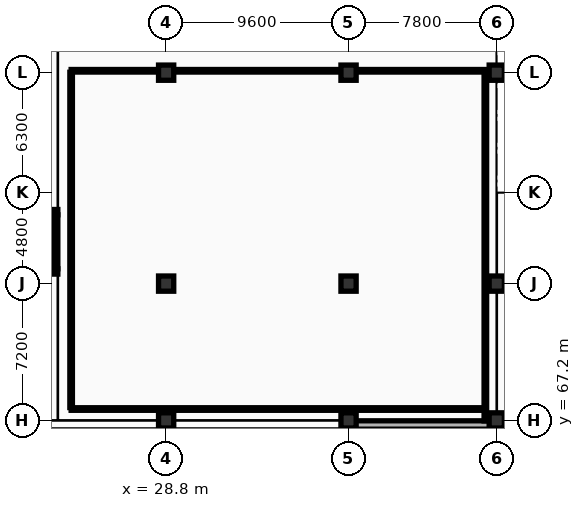
"""IFC4 building model, lengths in metres.
Left out: names, types, materials, properties, quantities, classifications, styles, units other than length and angle.
Written with IfcOpenShell. Run it as: python <this file> out.ifc"""

import sys

from ifc_helpers import new_model, si_unit, direction, frame, frame_2d, origin, origin_2d, place, context, subcontext, project, spatial, rectangle, extrude, element, fill, save


model = new_model("IFC4")
c1 = context("Model", 3, precision=1e-05, world=origin(), true_north=direction((0.0, 1.0)))
c2 = subcontext(c1, "Body", "Model", "MODEL_VIEW")
j1 = project(units=[si_unit("LENGTHUNIT", "METRE"), si_unit("PLANEANGLEUNIT", "RADIAN")], contexts=[c1])
p1 = place(None, origin())
s1 = spatial("IfcSite", under=j1, at=p1, CompositionType="ELEMENT")
p2 = place(p1, origin())
s2 = spatial("IfcBuilding", under=s1, at=p2, CompositionType="ELEMENT")
p3 = place(p2, origin())
s3 = spatial("IfcBuildingStorey", under=s2, at=p3, CompositionType="ELEMENT", Elevation=0.0)
for number, where, z_axis, x_axis in (
    (1, (28.8, 67.2, 0.0), (0.0, 0.0, 1.0), (1.0, 0.0, 0.0)),
    (2, (28.8, 74.4, 0.0), (0.0, 0.0, 1.0), (1.0, 0.0, 0.0)),
    (3, (28.8, 85.5, 0.0), (0.0, 0.0, 1.0), (1.0, 0.0, 0.0)),
    (4, (38.4, 67.2, 0.0), (0.0, 0.0, 1.0), (1.0, 0.0, 0.0)),
    (5, (38.4, 74.4, 0.0), (0.0, 0.0, 1.0), (1.0, 0.0, 0.0)),
    (6, (38.4, 85.5, 0.0), (0.0, 0.0, 1.0), (1.0, 0.0, 0.0)),
    (7, (46.2, 67.2, 0.0), (0.0, 0.0, 1.0), (1.0, 0.0, 0.0)),
    (8, (46.2, 74.4, 0.0), (0.0, 0.0, 1.0), (1.0, 0.0, 0.0)),
    (9, (46.2, 85.5, 0.0), (0.0, 0.0, 1.0), (1.0, 0.0, 0.0)),
):
    element("IfcColumn", number, at=place(p3, frame(where, z_axis=z_axis, x_axis=x_axis)), inside=s3, PredefinedType="COLUMN", context=c2, shape_type="SweptSolid", body=[
        extrude(rectangle(XDim=0.8, YDim=0.8, at=origin_2d()), origin(), (0.0, 0.0, 1.0), 5.4),
    ])
p4 = place(p3, frame((38.45, 66.96, 0.0), z_axis=(0.0, 0.0, 1.0), x_axis=(1.0, 0.0, 0.0)))
e10 = element("IfcWall", 10, at=p4, inside=s3, PredefinedType="STANDARD", context=c2, shape_type="SweptSolid", body=[
    extrude(rectangle(XDim=7.55, YDim=0.44, at=frame_2d((3.775, 0.0))), origin(), (0.0, 0.0, 1.0), 4.13),
])
p5 = place(p3, frame((20.1, 78.16, 0.0), z_axis=(0.0, 0.0, 1.0), x_axis=(1.0, 0.0, 0.0)))
e11 = element("IfcWall", 11, at=p5, inside=s3, PredefinedType="SHEAR", context=c2, shape_type="SweptSolid", body=[
    extrude(rectangle(XDim=3.0, YDim=0.28, at=frame_2d((1.5, 0.0))), origin(), (0.0, 0.0, 1.0), 5.14),
])
p6 = place(p5, frame((0.975, 0.0, 0.0)))
e12 = element("IfcOpeningElement", 12, at=p6, cuts=e11, PredefinedType="OPENING", context=c2, shape_type="SweptSolid", body=[
    extrude(rectangle(XDim=1.05, YDim=2.2, at=frame_2d((0.525, 1.1))), frame((0.0, 0.15, 0.0), z_axis=(0.0, -1.0, 0.0), x_axis=(1.0, 0.0, 0.0)), (0.0, 0.0, 1.0), 0.3),
])
p7 = place(p3, frame((23.1, 75.04, 0.0), z_axis=(0.0, 0.0, 1.0), x_axis=(-1.0, 0.0, 0.0)))
e13 = element("IfcWall", 13, at=p7, inside=s3, PredefinedType="SHEAR", context=c2, shape_type="SweptSolid", body=[
    extrude(rectangle(XDim=3.0, YDim=0.28, at=frame_2d((1.5, 0.0))), origin(), (0.0, 0.0, 1.0), 5.14),
])
p8 = place(p3, frame((22.96, 78.02, 0.0), z_axis=(0.0, 0.0, 1.0), x_axis=(0.0, -1.0, 0.0)))
e14 = element("IfcWall", 14, at=p8, inside=s3, PredefinedType="SHEAR", context=c2, shape_type="SweptSolid", body=[
    extrude(rectangle(XDim=2.84, YDim=0.28, at=frame_2d((1.42, 0.0))), origin(), (0.0, 0.0, 1.0), 5.14),
])
p9 = place(p3, frame((23.8, 85.6, 0.0), z_axis=(0.0, 0.0, 1.0), x_axis=(1.0, 0.0, 0.0)))
e15 = element("IfcWall", 15, at=p9, inside=s3, PredefinedType="PARTITIONING", context=c2, shape_type="SweptSolid", body=[
    extrude(rectangle(XDim=21.8, YDim=0.135, at=frame_2d((10.9, 0.0))), origin(), (0.0, 0.0, 1.0), 4.23),
])
p10 = place(p9, frame((8.41, 0.0, 0.0)))
e16 = element("IfcOpeningElement", 16, at=p10, cuts=e15, PredefinedType="OPENING", context=c2, shape_type="SweptSolid", body=[
    extrude(rectangle(XDim=0.95, YDim=2.15, at=frame_2d((0.475, 1.075))), frame((0.0, 0.077, 0.0), z_axis=(0.0, -1.0, 0.0), x_axis=(1.0, 0.0, 0.0)), (0.0, 0.0, 1.0), 0.155),
])
p11 = place(p3, frame((45.6, 67.8, 0.0), z_axis=(0.0, 0.0, 1.0), x_axis=(-1.0, 0.0, 0.0)))
e17 = element("IfcWall", 17, at=p11, inside=s3, PredefinedType="PARTITIONING", context=c2, shape_type="SweptSolid", body=[
    extrude(rectangle(XDim=21.8, YDim=0.135, at=frame_2d((10.9, 0.0))), origin(), (0.0, 0.0, 1.0), 4.58),
])
p12 = place(p3, frame((23.8, 67.877, 0.0), z_axis=(0.0, 0.0, 1.0), x_axis=(0.0, 1.0, 0.0)))
e18 = element("IfcWall", 18, at=p12, inside=s3, PredefinedType="PARTITIONING", context=c2, shape_type="SweptSolid", body=[
    extrude(rectangle(XDim=17.645, YDim=0.135, at=frame_2d((8.823, 0.0))), origin(), (0.0, 0.0, 1.0), 4.33),
])
p13 = place(p3, frame((45.6, 85.522, 0.0), z_axis=(0.0, 0.0, 1.0), x_axis=(0.0, -1.0, 0.0)))
e19 = element("IfcWall", 19, at=p13, inside=s3, PredefinedType="PARTITIONING", context=c2, shape_type="SweptSolid", body=[
    extrude(rectangle(XDim=18.348, YDim=0.135, at=frame_2d((9.174, 0.0))), origin(), (0.0, 0.0, 1.0), 4.47),
])
p14 = place(p10, origin())
e20 = element("IfcDoor", 20, at=p14, inside=s3, OperationType="SINGLE_SWING_LEFT", PredefinedType="DOOR", context=c2, shape_type="SweptSolid", body=[
    extrude(rectangle(XDim=0.95, YDim=2.15, at=frame_2d((0.475, 1.075))), frame((0.0, 0.025, 0.0), z_axis=(0.0, -1.0, 0.0), x_axis=(1.0, 0.0, 0.0)), (0.0, 0.0, 1.0), 0.05),
])
fill(e16, e20)
save(model, sys.argv[1])
